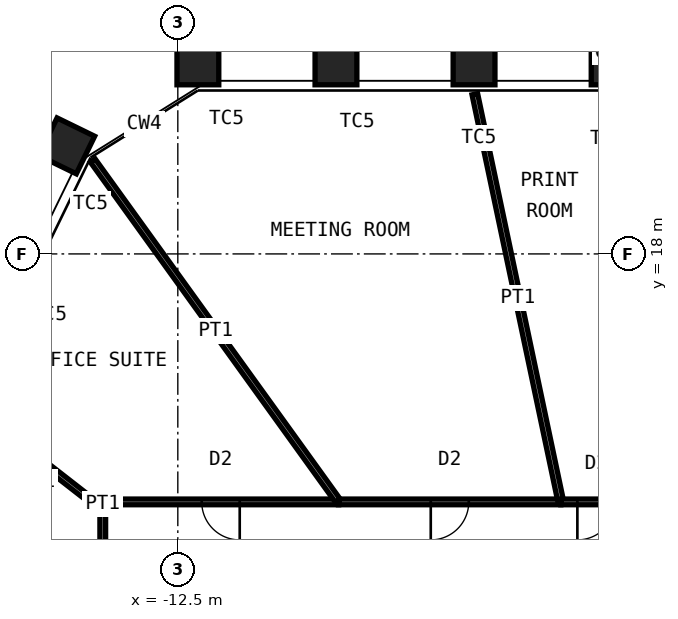
"""IFC4 building model, lengths in metres.
Left out: names, types, materials, properties, quantities, classifications, styles, units other than length and angle.
Written with IfcOpenShell. Run it as: python <this file> out.ifc"""

import sys

from ifc_helpers import new_model, si_unit, direction, frame, frame_2d, origin, origin_2d, place, context, subcontext, project, spatial, rectangle, hollow_rectangle, extrude, element, fill, save


model = new_model("IFC4")
c1 = context("Model", 3, precision=1e-05, world=origin(), true_north=direction((0.0, 1.0)))
c2 = subcontext(c1, "Body", "Model", "MODEL_VIEW")
j1 = project(units=[si_unit("LENGTHUNIT", "METRE"), si_unit("PLANEANGLEUNIT", "RADIAN")], contexts=[c1])
p1 = place(None, origin())
s1 = spatial("IfcSite", under=j1, at=p1, CompositionType="ELEMENT")
p2 = place(p1, origin())
s2 = spatial("IfcBuilding", under=s1, at=p2, CompositionType="ELEMENT")
p3 = place(p2, frame((0.0, 0.0, 201.4)))
s3 = spatial("IfcBuildingStorey", under=s2, at=p3, CompositionType="ELEMENT", Elevation=201.4)
for number, where, z_axis, x_axis in (
    (1, (-11.972, 23.0, 0.0), (0.0, 0.0, 1.0), (-1.0, 0.0, 0.0)),
    (2, (-8.338, 23.0, 0.0), (0.0, 0.0, 1.0), (-1.0, 0.0, 0.0)),
    (3, (-4.705, 23.0, 0.0), (0.0, 0.0, 1.0), (-1.0, 0.0, 0.0)),
    (4, (-1.071, 23.0, 0.0), (0.0, 0.0, 1.0), (-1.0, 0.0, 0.0)),
    (5, (-15.424, 20.843, 0.0), (0.0, 0.0, 1.0), (-0.438, -0.899, 0.0)),
):
    element("IfcColumn", number, at=place(p3, frame(where, z_axis=z_axis, x_axis=x_axis)), inside=s3, PredefinedType="COLUMN", context=c2, shape_type="SweptSolid", body=[
        extrude(hollow_rectangle(XDim=1.1, YDim=1.1, WallThickness=0.07, at=origin_2d()), origin(), (0.0, 0.0, 1.0), 4.2),
    ])
p4 = place(p3, frame((-14.475, 5.11, 0.0), z_axis=(0.0, 0.0, 1.0), x_axis=(0.0, 1.0, 0.0)))
e6 = element("IfcWall", 6, at=p4, inside=s3, PredefinedType="PARTITIONING", context=c2, shape_type="SweptSolid", body=[
    extrude(rectangle(XDim=6.164, YDim=0.15, at=frame_2d((3.082, 0.0))), origin(), (0.0, 0.0, 1.0), 4.03),
])
p5 = place(p4, frame((2.582, 0.0, 0.0)))
e7 = element("IfcOpeningElement", 7, at=p5, cuts=e6, PredefinedType="OPENING", context=c2, shape_type="SweptSolid", body=[
    extrude(rectangle(XDim=1.0, YDim=2.4, at=frame_2d((0.5, 1.2))), frame((0.0, 0.085, 0.0), z_axis=(0.0, -1.0, 0.0), x_axis=(1.0, 0.0, 0.0)), (0.0, 0.0, 1.0), 0.17),
])
p6 = place(p3, frame((-17.902, 13.943, 0.0), z_axis=(0.0, 0.0, 1.0), x_axis=(0.788919197717, -0.614496948303, 0.0)))
e8 = element("IfcWall", 8, at=p6, inside=s3, PredefinedType="PARTITIONING", context=c2, shape_type="SweptSolid", body=[
    extrude(rectangle(XDim=4.343, YDim=0.15, at=frame_2d((2.172, 0.0))), origin(), (0.0, 0.0, 1.0), 3.43),
])
p7 = place(p3, frame((-14.475, 11.369, 0.0), z_axis=(0.0, 0.0, 1.0), x_axis=(0.0, 1.0, 0.0)))
e9 = element("IfcWall", 9, at=p7, inside=s3, PredefinedType="PARTITIONING", context=c2, shape_type="SweptSolid", body=[
    extrude(rectangle(XDim=0.106, YDim=0.15, at=frame_2d((0.053, 0.0))), origin(), (0.0, 0.0, 1.0), 4.03),
])
p8 = place(p3, frame((-14.475, 11.475, 0.0), z_axis=(0.0, 0.0, 1.0), x_axis=(1.0, 0.0, 0.0)))
e10 = element("IfcWall", 10, at=p8, inside=s3, PredefinedType="PARTITIONING", context=c2, shape_type="SweptSolid", body=[
    extrude(rectangle(XDim=6.208, YDim=0.15, at=frame_2d((3.104, 0.0))), origin(), (0.0, 0.0, 1.0), 4.03),
])
p9 = place(p8, frame((2.604, 0.0, 0.0)))
e11 = element("IfcOpeningElement", 11, at=p9, cuts=e10, PredefinedType="OPENING", context=c2, shape_type="SweptSolid", body=[
    extrude(rectangle(XDim=1.0, YDim=2.4, at=frame_2d((0.5, 1.2))), frame((0.0, 0.085, 0.0), z_axis=(0.0, -1.0, 0.0), x_axis=(1.0, 0.0, 0.0)), (0.0, 0.0, 1.0), 0.17),
])
p10 = place(p3, frame((-14.737, 20.455, 0.0), z_axis=(0.0, 0.0, 1.0), x_axis=(0.584547025688, -0.811359830629, 0.0)))
e12 = element("IfcWall", 12, at=p10, inside=s3, PredefinedType="PARTITIONING", context=c2, shape_type="SweptSolid", body=[
    extrude(rectangle(XDim=11.068, YDim=0.15, at=frame_2d((5.534, 0.0))), origin(), (0.0, 0.0, 1.0), 2.93),
])
p11 = place(p3, frame((-8.267, 11.475, 0.0), z_axis=(0.0, 0.0, 1.0), x_axis=(1.0, 0.0, 0.0)))
e13 = element("IfcWall", 13, at=p11, inside=s3, PredefinedType="PARTITIONING", context=c2, shape_type="SweptSolid", body=[
    extrude(rectangle(XDim=5.846, YDim=0.15, at=frame_2d((2.923, 0.0))), origin(), (0.0, 0.0, 1.0), 4.03),
])
p12 = place(p11, frame((2.423, 0.0, 0.0)))
e14 = element("IfcOpeningElement", 14, at=p12, cuts=e13, PredefinedType="OPENING", context=c2, shape_type="SweptSolid", body=[
    extrude(rectangle(XDim=1.0, YDim=2.4, at=frame_2d((0.5, 1.2))), frame((0.0, 0.085, 0.0), z_axis=(0.0, -1.0, 0.0), x_axis=(1.0, 0.0, 0.0)), (0.0, 0.0, 1.0), 0.17),
])
p13 = place(p3, frame((-4.684, 22.202, 0.0), z_axis=(0.0, 0.0, 1.0), x_axis=(0.206456017157, -0.978455881979, 0.0)))
e15 = element("IfcWall", 15, at=p13, inside=s3, PredefinedType="PARTITIONING", context=c2, shape_type="SweptSolid", body=[
    extrude(rectangle(XDim=10.963, YDim=0.15, at=frame_2d((5.481, 0.0))), origin(), (0.0, 0.0, 1.0), 3.43),
])
p14 = place(p3, frame((-2.421, 11.475, 0.0), z_axis=(0.0, 0.0, 1.0), x_axis=(1.0, 0.0, 0.0)))
e16 = element("IfcWall", 16, at=p14, inside=s3, PredefinedType="PARTITIONING", context=c2, shape_type="SweptSolid", body=[
    extrude(rectangle(XDim=1.87, YDim=0.15, at=frame_2d((0.935, 0.0))), origin(), (0.0, 0.0, 1.0), 4.03),
])
p15 = place(p14, frame((0.435, 0.0, 0.0)))
e17 = element("IfcOpeningElement", 17, at=p15, cuts=e16, PredefinedType="OPENING", context=c2, shape_type="SweptSolid", body=[
    extrude(rectangle(XDim=1.0, YDim=2.4, at=frame_2d((0.5, 1.2))), frame((0.0, 0.085, 0.0), z_axis=(0.0, -1.0, 0.0), x_axis=(1.0, 0.0, 0.0)), (0.0, 0.0, 1.0), 0.17),
])
p16 = place(p9, origin())
e18 = element("IfcDoor", 18, at=p16, inside=s3, OperationType="SINGLE_SWING_RIGHT", PredefinedType="DOOR", context=c2, shape_type="SweptSolid", body=[
    extrude(rectangle(XDim=1.0, YDim=2.4, at=frame_2d((0.5, 1.2))), frame((0.0, 0.025, 0.0), z_axis=(0.0, -1.0, 0.0), x_axis=(1.0, 0.0, 0.0)), (0.0, 0.0, 1.0), 0.05),
])
fill(e11, e18)
p17 = place(p12, origin())
e19 = element("IfcDoor", 19, at=p17, inside=s3, OperationType="SINGLE_SWING_LEFT", PredefinedType="DOOR", context=c2, shape_type="SweptSolid", body=[
    extrude(rectangle(XDim=1.0, YDim=2.4, at=frame_2d((0.5, 1.2))), frame((0.0, 0.025, 0.0), z_axis=(0.0, -1.0, 0.0), x_axis=(1.0, 0.0, 0.0)), (0.0, 0.0, 1.0), 0.05),
])
fill(e14, e19)
p18 = place(p15, origin())
e20 = element("IfcDoor", 20, at=p18, inside=s3, OperationType="SINGLE_SWING_LEFT", PredefinedType="DOOR", context=c2, shape_type="SweptSolid", body=[
    extrude(rectangle(XDim=1.0, YDim=2.4, at=frame_2d((0.5, 1.2))), frame((0.0, 0.025, 0.0), z_axis=(0.0, -1.0, 0.0), x_axis=(1.0, 0.0, 0.0)), (0.0, 0.0, 1.0), 0.05),
])
fill(e17, e20)
save(model, sys.argv[1])
